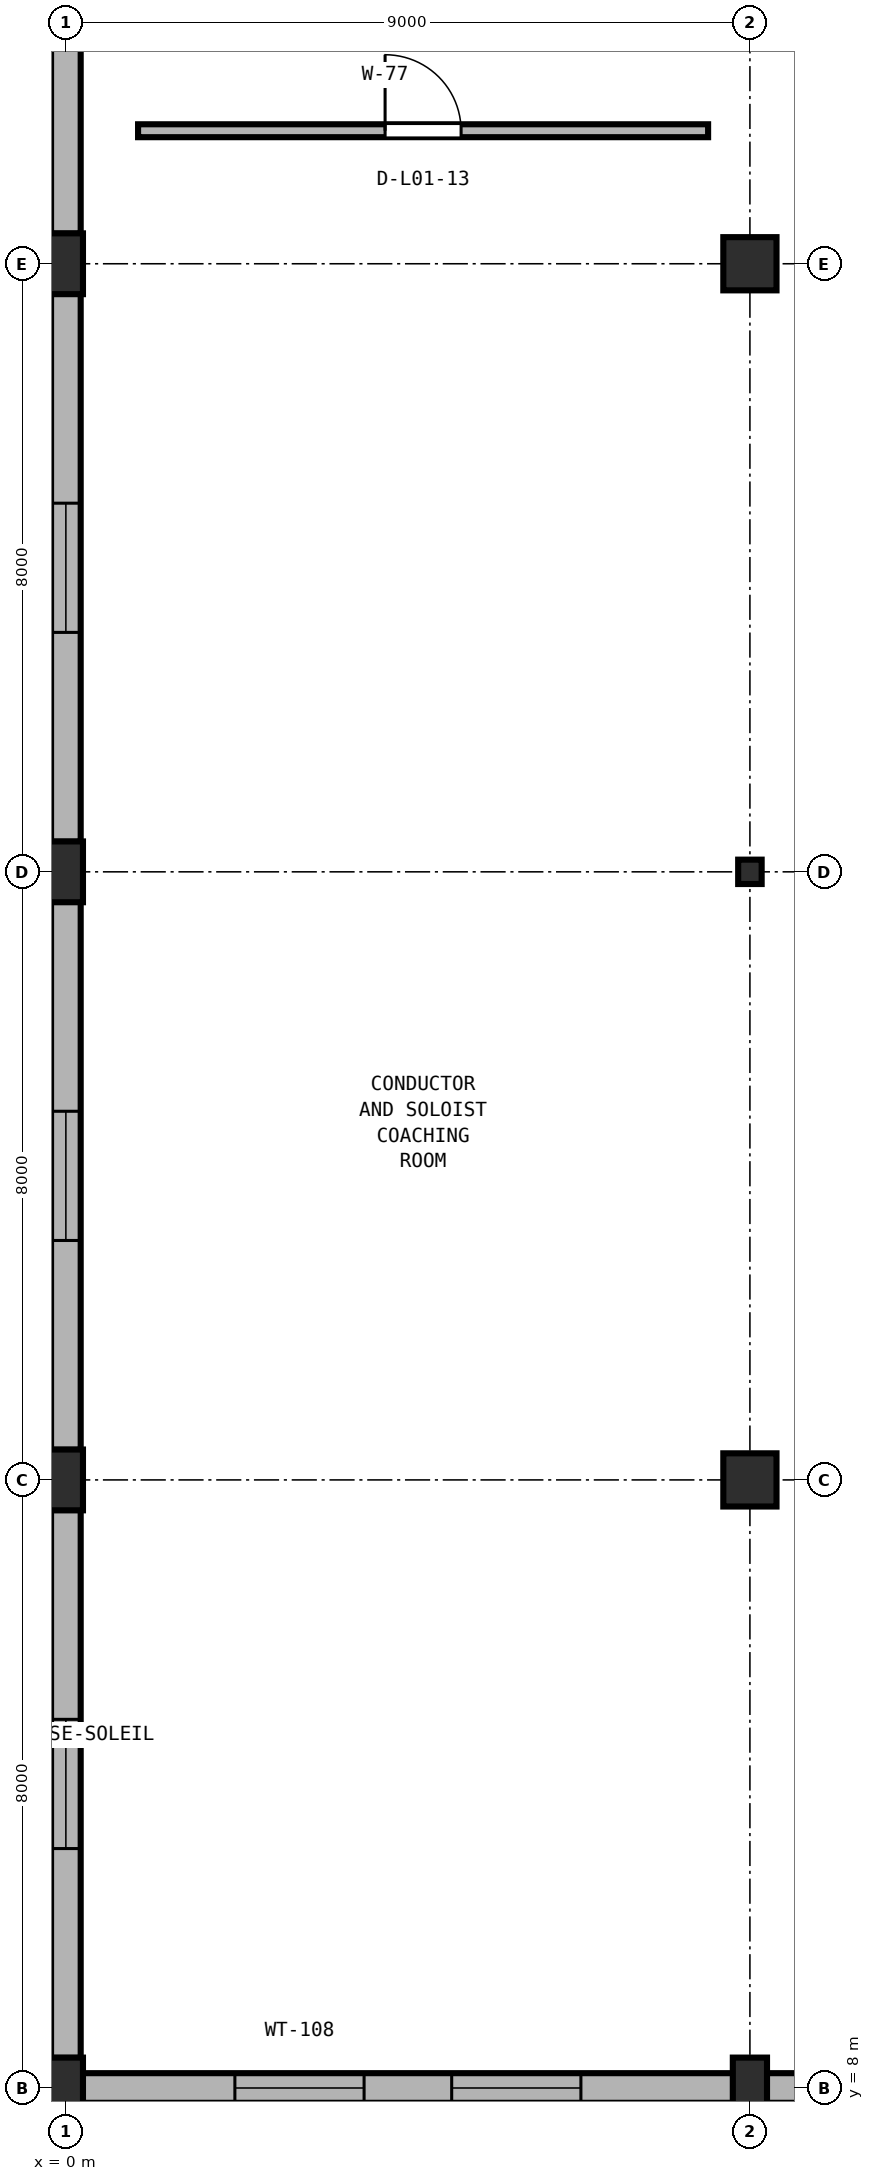
"""IFC4 building model, lengths in metres.
Left out: names, types, materials, properties, quantities, classifications, styles, units other than length and angle.
Written with IfcOpenShell. Run it as: python <this file> out.ifc"""

import sys

from ifc_helpers import new_model, si_unit, direction, frame, frame_2d, origin, origin_2d, place, context, subcontext, project, spatial, rectangle, i_section, extrude, element, fill, save


model = new_model("IFC4")
c1 = context("Model", 3, precision=1e-05, world=origin(), true_north=direction((0.0, 1.0)))
c2 = subcontext(c1, "Body", "Model", "MODEL_VIEW")
j1 = project(units=[si_unit("LENGTHUNIT", "METRE"), si_unit("PLANEANGLEUNIT", "RADIAN")], contexts=[c1])
p1 = place(None, origin())
s1 = spatial("IfcSite", under=j1, at=p1, CompositionType="ELEMENT")
p2 = place(p1, origin())
s2 = spatial("IfcBuilding", under=s1, at=p2, CompositionType="ELEMENT")
p3 = place(p2, frame((0.0, 0.0, 5.4)))
s3 = spatial("IfcBuildingStorey", under=s2, at=p3, CompositionType="ELEMENT", Elevation=5.4)
for number, where, z_axis, x_axis in (
    (1, (0.0, 8.0, 0.0), (0.0, 0.0, 1.0), (1.0, 0.0, 0.0)),
    (2, (0.0, 16.0, 0.0), (0.0, 0.0, 1.0), (1.0, 0.0, 0.0)),
    (3, (0.0, 24.0, 0.0), (0.0, 0.0, 1.0), (1.0, 0.0, 0.0)),
    (4, (0.0, 32.0, 0.0), (0.0, 0.0, 1.0), (1.0, 0.0, 0.0)),
    (5, (9.0, 8.0, 0.0), (0.0, 0.0, 1.0), (1.0, 0.0, 0.0)),
):
    element("IfcColumn", number, at=place(p3, frame(where, z_axis=z_axis, x_axis=x_axis)), inside=s3, PredefinedType="PILASTER", context=c2, shape_type="SweptSolid", body=[
        extrude(rectangle(XDim=0.45, YDim=0.8, at=origin_2d()), origin(), (0.0, 0.0, 1.0), 4.54),
    ])
p4 = place(p3, frame((9.0, 16.0, 0.0), z_axis=(0.0, 0.0, 1.0), x_axis=(1.0, 0.0, 0.0)))
e6 = element("IfcColumn", 6, at=p4, inside=s3, PredefinedType="COLUMN", context=c2, shape_type="SweptSolid", body=[
    extrude(rectangle(XDim=0.7, YDim=0.7, at=origin_2d()), origin(), (0.0, 0.0, 1.0), 4.54),
])
p5 = place(p3, frame((9.0, 24.0, 0.0), z_axis=(0.0, 0.0, 1.0), x_axis=(1.0, 0.0, 0.0)))
e7 = element("IfcColumn", 7, at=p5, inside=s3, PredefinedType="COLUMN", context=c2, shape_type="SweptSolid", body=[
    extrude(i_section(OverallWidth=0.309, OverallDepth=0.321, WebThickness=0.014, FlangeThickness=0.022, FilletRadius=0.017, at=origin_2d()), origin(), (0.0, 0.0, 1.0), 4.54),
])
p6 = place(p3, frame((9.0, 32.0, 0.0), z_axis=(0.0, 0.0, 1.0), x_axis=(1.0, 0.0, 0.0)))
e8 = element("IfcColumn", 8, at=p6, inside=s3, PredefinedType="COLUMN", context=c2, shape_type="SweptSolid", body=[
    extrude(rectangle(XDim=0.7, YDim=0.7, at=origin_2d()), origin(), (0.0, 0.0, 1.0), 4.54),
])
p7 = place(p3, frame((0.221, 8.0, 0.0), z_axis=(0.0, 0.0, 1.0), x_axis=(1.0, 0.0, 0.0)))
e9 = element("IfcWall", 9, at=p7, inside=s3, PredefinedType="SOLIDWALL", context=c2, shape_type="SweptSolid", body=[
    extrude(rectangle(XDim=8.558, YDim=0.39, at=frame_2d((4.279, 0.0))), origin(), (0.0, 0.0, 1.0), 4.152),
])
p8 = place(p7, frame((2.003, 0.0, 0.85)))
e10 = element("IfcOpeningElement", 10, at=p8, cuts=e9, PredefinedType="OPENING", context=c2, shape_type="SweptSolid", body=[
    extrude(rectangle(XDim=1.7, YDim=2.55, at=frame_2d((0.85, 1.275))), frame((0.0, 0.205, 0.0), z_axis=(0.0, -1.0, 0.0), x_axis=(1.0, 0.0, 0.0)), (0.0, 0.0, 1.0), 0.41),
])
p9 = place(p7, frame((4.855, 0.0, 0.85)))
e11 = element("IfcOpeningElement", 11, at=p9, cuts=e9, PredefinedType="OPENING", context=c2, shape_type="SweptSolid", body=[
    extrude(rectangle(XDim=1.7, YDim=2.55, at=frame_2d((0.85, 1.275))), frame((0.0, 0.205, 0.0), z_axis=(0.0, -1.0, 0.0), x_axis=(1.0, 0.0, 0.0)), (0.0, 0.0, 1.0), 0.41),
])
p10 = place(p3, frame((9.221, 8.0, 0.0), z_axis=(0.0, 0.0, 1.0), x_axis=(1.0, 0.0, 0.0)))
e12 = element("IfcWall", 12, at=p10, inside=s3, PredefinedType="SOLIDWALL", context=c2, shape_type="SweptSolid", body=[
    extrude(rectangle(XDim=8.558, YDim=0.39, at=frame_2d((4.279, 0.0))), origin(), (0.0, 0.0, 1.0), 4.152),
])
p11 = place(p10, frame((2.003, 0.0, 0.85)))
e13 = element("IfcOpeningElement", 13, at=p11, cuts=e12, PredefinedType="OPENING", context=c2, shape_type="SweptSolid", body=[
    extrude(rectangle(XDim=1.7, YDim=2.55, at=frame_2d((0.85, 1.275))), frame((0.0, 0.205, 0.0), z_axis=(0.0, -1.0, 0.0), x_axis=(1.0, 0.0, 0.0)), (0.0, 0.0, 1.0), 0.41),
])
p12 = place(p10, frame((4.855, 0.0, 0.85)))
e14 = element("IfcOpeningElement", 14, at=p12, cuts=e12, PredefinedType="OPENING", context=c2, shape_type="SweptSolid", body=[
    extrude(rectangle(XDim=1.7, YDim=2.55, at=frame_2d((0.85, 1.275))), frame((0.0, 0.205, 0.0), z_axis=(0.0, -1.0, 0.0), x_axis=(1.0, 0.0, 0.0)), (0.0, 0.0, 1.0), 0.41),
])
p13 = place(p3, frame((0.0, 8.396, 0.0), z_axis=(0.0, 0.0, 1.0), x_axis=(0.0, 1.0, 0.0)))
e15 = element("IfcWall", 15, at=p13, inside=s3, PredefinedType="SOLIDWALL", context=c2, shape_type="SweptSolid", body=[
    extrude(rectangle(XDim=7.208, YDim=0.39, at=frame_2d((3.604, 0.0))), origin(), (0.0, 0.0, 1.0), 4.152),
])
p14 = place(p13, frame((2.754, 0.0, 0.85)))
e16 = element("IfcOpeningElement", 16, at=p14, cuts=e15, PredefinedType="OPENING", context=c2, shape_type="SweptSolid", body=[
    extrude(rectangle(XDim=1.7, YDim=2.55, at=frame_2d((0.85, 1.275))), frame((0.0, 0.205, 0.0), z_axis=(0.0, -1.0, 0.0), x_axis=(1.0, 0.0, 0.0)), (0.0, 0.0, 1.0), 0.41),
])
p15 = place(p3, frame((0.0, 16.396, 0.0), z_axis=(0.0, 0.0, 1.0), x_axis=(0.0, 1.0, 0.0)))
e17 = element("IfcWall", 17, at=p15, inside=s3, PredefinedType="SOLIDWALL", context=c2, shape_type="SweptSolid", body=[
    extrude(rectangle(XDim=7.208, YDim=0.39, at=frame_2d((3.604, 0.0))), origin(), (0.0, 0.0, 1.0), 4.152),
])
p16 = place(p15, frame((2.754, 0.0, 0.85)))
e18 = element("IfcOpeningElement", 18, at=p16, cuts=e17, PredefinedType="OPENING", context=c2, shape_type="SweptSolid", body=[
    extrude(rectangle(XDim=1.7, YDim=2.55, at=frame_2d((0.85, 1.275))), frame((0.0, 0.205, 0.0), z_axis=(0.0, -1.0, 0.0), x_axis=(1.0, 0.0, 0.0)), (0.0, 0.0, 1.0), 0.41),
])
p17 = place(p3, frame((0.0, 24.396, 0.0), z_axis=(0.0, 0.0, 1.0), x_axis=(0.0, 1.0, 0.0)))
e19 = element("IfcWall", 19, at=p17, inside=s3, PredefinedType="SOLIDWALL", context=c2, shape_type="SweptSolid", body=[
    extrude(rectangle(XDim=7.208, YDim=0.39, at=frame_2d((3.604, 0.0))), origin(), (0.0, 0.0, 1.0), 4.152),
])
p18 = place(p17, frame((2.754, 0.0, 0.85)))
e20 = element("IfcOpeningElement", 20, at=p18, cuts=e19, PredefinedType="OPENING", context=c2, shape_type="SweptSolid", body=[
    extrude(rectangle(XDim=1.7, YDim=2.55, at=frame_2d((0.85, 1.275))), frame((0.0, 0.205, 0.0), z_axis=(0.0, -1.0, 0.0), x_axis=(1.0, 0.0, 0.0)), (0.0, 0.0, 1.0), 0.41),
])
p19 = place(p3, frame((0.0, 32.396, 0.0), z_axis=(0.0, 0.0, 1.0), x_axis=(0.0, 1.0, 0.0)))
e21 = element("IfcWall", 21, at=p19, inside=s3, PredefinedType="SOLIDWALL", context=c2, shape_type="SweptSolid", body=[
    extrude(rectangle(XDim=7.208, YDim=0.39, at=frame_2d((3.604, 0.0))), origin(), (0.0, 0.0, 1.0), 4.152),
])
p20 = place(p19, frame((2.754, 0.0, 0.85)))
e22 = element("IfcOpeningElement", 22, at=p20, cuts=e21, PredefinedType="OPENING", context=c2, shape_type="SweptSolid", body=[
    extrude(rectangle(XDim=1.7, YDim=2.55, at=frame_2d((0.85, 1.275))), frame((0.0, 0.205, 0.0), z_axis=(0.0, -1.0, 0.0), x_axis=(1.0, 0.0, 0.0)), (0.0, 0.0, 1.0), 0.41),
])
p21 = place(p3, frame((0.95, 33.75, 0.0), z_axis=(0.0, 0.0, 1.0), x_axis=(1.0, 0.0, 0.0)))
e23 = element("IfcWall", 23, at=p21, inside=s3, PredefinedType="MOVABLE", context=c2, shape_type="SweptSolid", body=[
    extrude(rectangle(XDim=7.5, YDim=0.17, at=frame_2d((3.75, 0.0))), origin(), (0.0, 0.0, 1.0), 4.49),
])
p22 = place(p21, frame((3.25, 0.0, 0.0)))
e24 = element("IfcOpeningElement", 24, at=p22, cuts=e23, PredefinedType="OPENING", context=c2, shape_type="SweptSolid", body=[
    extrude(rectangle(XDim=1.0, YDim=2.15, at=frame_2d((0.5, 1.075))), frame((0.0, 0.095, 0.0), z_axis=(0.0, -1.0, 0.0), x_axis=(1.0, 0.0, 0.0)), (0.0, 0.0, 1.0), 0.19),
])
p23 = place(p8, origin())
e25 = element("IfcWindow", 25, at=p23, inside=s3, PartitioningType="SINGLE_PANEL", PredefinedType="WINDOW", context=c2, shape_type="SweptSolid", body=[
    extrude(rectangle(XDim=1.7, YDim=2.55, at=frame_2d((0.85, 1.275))), frame((0.0, 0.03, 0.0), z_axis=(0.0, -1.0, 0.0), x_axis=(1.0, 0.0, 0.0)), (0.0, 0.0, 1.0), 0.06),
])
fill(e10, e25)
p24 = place(p9, origin())
e26 = element("IfcWindow", 26, at=p24, inside=s3, PartitioningType="SINGLE_PANEL", PredefinedType="WINDOW", context=c2, shape_type="SweptSolid", body=[
    extrude(rectangle(XDim=1.7, YDim=2.55, at=frame_2d((0.85, 1.275))), frame((0.0, 0.03, 0.0), z_axis=(0.0, -1.0, 0.0), x_axis=(1.0, 0.0, 0.0)), (0.0, 0.0, 1.0), 0.06),
])
fill(e11, e26)
p25 = place(p14, origin())
e27 = element("IfcWindow", 27, at=p25, inside=s3, PartitioningType="SINGLE_PANEL", PredefinedType="WINDOW", context=c2, shape_type="SweptSolid", body=[
    extrude(rectangle(XDim=1.7, YDim=2.55, at=frame_2d((0.85, 1.275))), frame((0.0, 0.03, 0.0), z_axis=(0.0, -1.0, 0.0), x_axis=(1.0, 0.0, 0.0)), (0.0, 0.0, 1.0), 0.06),
])
fill(e16, e27)
p26 = place(p16, origin())
e28 = element("IfcWindow", 28, at=p26, inside=s3, PartitioningType="SINGLE_PANEL", PredefinedType="WINDOW", context=c2, shape_type="SweptSolid", body=[
    extrude(rectangle(XDim=1.7, YDim=2.55, at=frame_2d((0.85, 1.275))), frame((0.0, 0.03, 0.0), z_axis=(0.0, -1.0, 0.0), x_axis=(1.0, 0.0, 0.0)), (0.0, 0.0, 1.0), 0.06),
])
fill(e18, e28)
p27 = place(p18, origin())
e29 = element("IfcWindow", 29, at=p27, inside=s3, PartitioningType="SINGLE_PANEL", PredefinedType="WINDOW", context=c2, shape_type="SweptSolid", body=[
    extrude(rectangle(XDim=1.7, YDim=2.55, at=frame_2d((0.85, 1.275))), frame((0.0, 0.03, 0.0), z_axis=(0.0, -1.0, 0.0), x_axis=(1.0, 0.0, 0.0)), (0.0, 0.0, 1.0), 0.06),
])
fill(e20, e29)
p28 = place(p22, origin())
e30 = element("IfcDoor", 30, at=p28, inside=s3, OperationType="SINGLE_SWING_LEFT", PredefinedType="DOOR", context=c2, shape_type="SweptSolid", body=[
    extrude(rectangle(XDim=1.0, YDim=2.15, at=frame_2d((0.5, 1.075))), frame((0.0, 0.025, 0.0), z_axis=(0.0, -1.0, 0.0), x_axis=(1.0, 0.0, 0.0)), (0.0, 0.0, 1.0), 0.05),
])
fill(e24, e30)
save(model, sys.argv[1])
